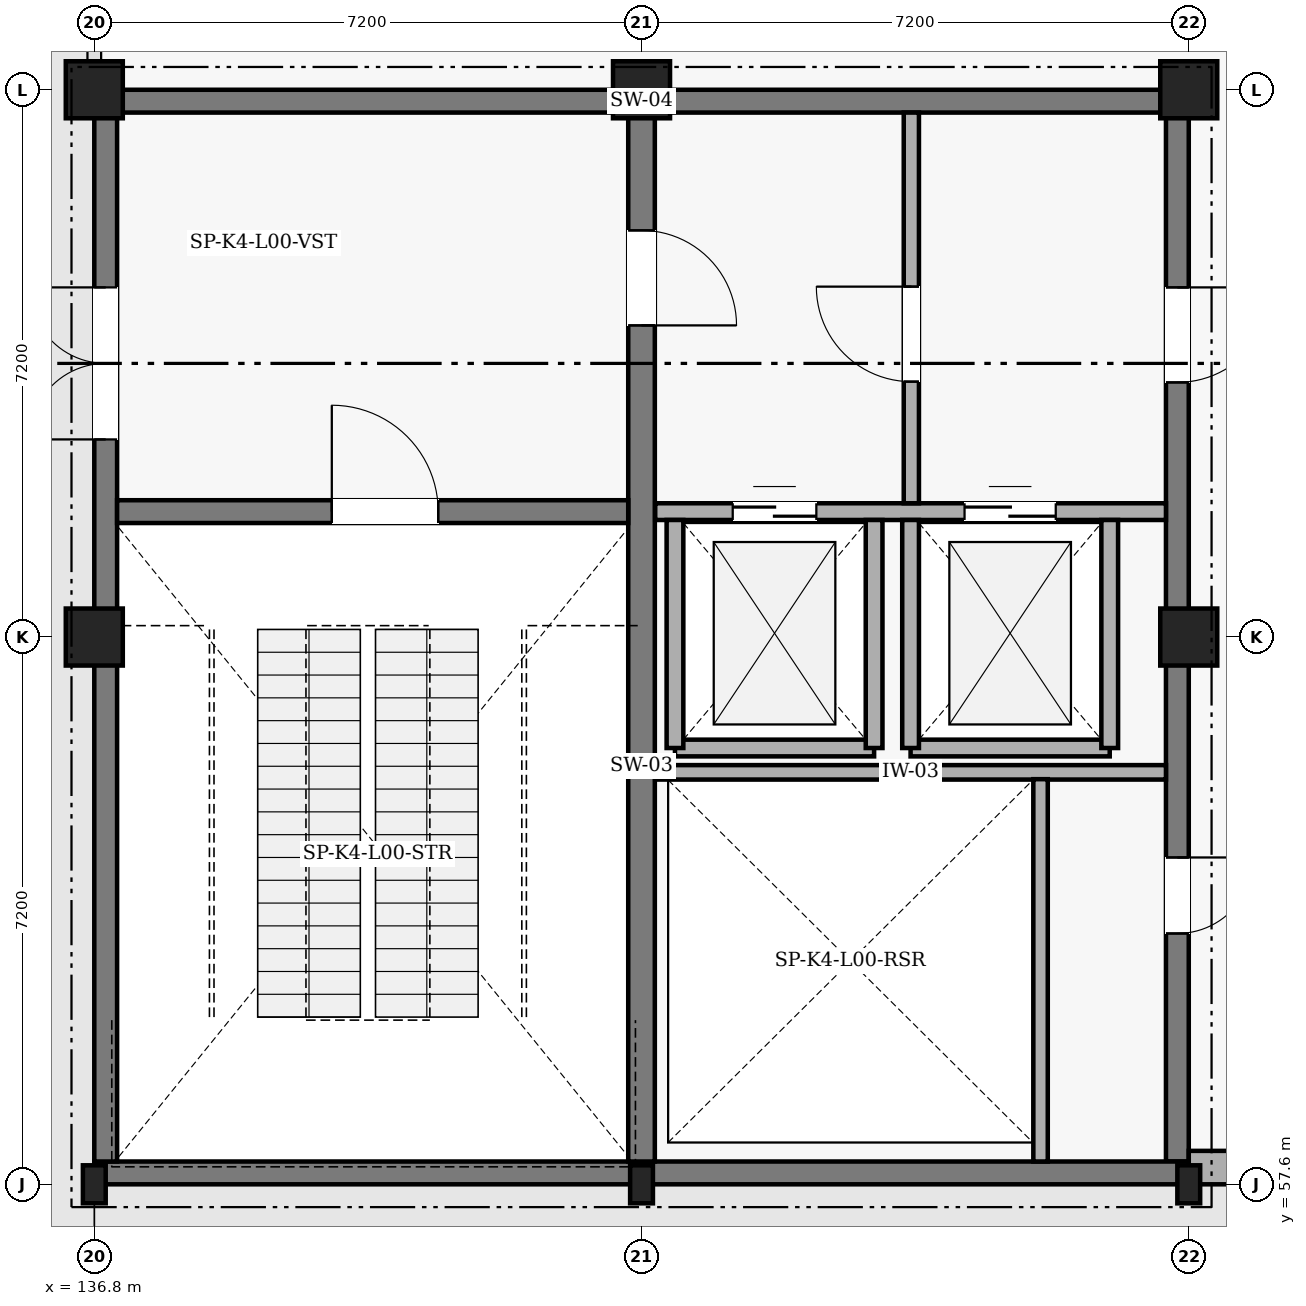
"""IFC4 building model, lengths in metres.
Left out: names, types, materials, properties, quantities, classifications, styles, units other than length and angle.
Written with IfcOpenShell. Run it as: python <this file> out.ifc"""

import sys

from ifc_helpers import new_model, si_unit, direction, frame, frame_2d, origin, origin_2d, place, context, subcontext, project, spatial, rectangle, i_section, extrude, element, fill, save


model = new_model("IFC4")
c1 = context("Model", 3, precision=1e-05, world=origin(), true_north=direction((0.0, 1.0)))
c2 = subcontext(c1, "Body", "Model", "MODEL_VIEW")
j1 = project(units=[si_unit("LENGTHUNIT", "METRE"), si_unit("PLANEANGLEUNIT", "RADIAN")], contexts=[c1])
p1 = place(None, origin())
s1 = spatial("IfcSite", under=j1, at=p1, CompositionType="ELEMENT")
p2 = place(p1, origin())
s2 = spatial("IfcBuilding", under=s1, at=p2, CompositionType="ELEMENT")
p3 = place(p2, origin())
s3 = spatial("IfcBuildingStorey", under=s2, at=p3, CompositionType="ELEMENT", Elevation=0.0)
p4 = place(p3, frame((136.8, 71.85, 0.0), z_axis=(0.0, 0.0, 1.0), x_axis=(1.0, 0.0, 0.0)))
e1 = element("IfcWall", 1, at=p4, inside=s3, PredefinedType="SHEAR", context=c2, shape_type="SweptSolid", body=[
    extrude(rectangle(XDim=14.4, YDim=0.3, at=frame_2d((7.2, 0.0))), origin(), (0.0, 0.0, 1.0), 5.4),
])
p5 = place(p3, frame((151.05, 71.7, 0.0), z_axis=(0.0, 0.0, 1.0), x_axis=(0.0, -1.0, 0.0)))
e2 = element("IfcWall", 2, at=p5, inside=s3, PredefinedType="SHEAR", context=c2, shape_type="SweptSolid", body=[
    extrude(rectangle(XDim=13.8, YDim=0.3, at=frame_2d((6.9, 0.0))), origin(), (0.0, 0.0, 1.0), 5.4),
])
p6 = place(p5, frame((9.8, 0.0, 0.0)))
e3 = element("IfcOpeningElement", 3, at=p6, cuts=e2, PredefinedType="OPENING", context=c2, shape_type="SweptSolid", body=[
    extrude(rectangle(XDim=1.0, YDim=2.15, at=frame_2d((0.5, 1.075))), frame((0.0, 0.16, 0.0), z_axis=(0.0, -1.0, 0.0), x_axis=(1.0, 0.0, 0.0)), (0.0, 0.0, 1.0), 0.32),
])
p7 = place(p5, frame((2.3, 0.0, 0.0)))
e4 = element("IfcOpeningElement", 4, at=p7, cuts=e2, PredefinedType="OPENING", context=c2, shape_type="SweptSolid", body=[
    extrude(rectangle(XDim=1.25, YDim=2.2, at=frame_2d((0.625, 1.1))), frame((0.0, 0.16, 0.0), z_axis=(0.0, -1.0, 0.0), x_axis=(1.0, 0.0, 0.0)), (0.0, 0.0, 1.0), 0.32),
])
p8 = place(p3, frame((151.2, 57.75, 0.0), z_axis=(0.0, 0.0, 1.0), x_axis=(-1.0, 0.0, 0.0)))
e5 = element("IfcWall", 5, at=p8, inside=s3, PredefinedType="SHEAR", context=c2, shape_type="SweptSolid", body=[
    extrude(rectangle(XDim=14.4, YDim=0.3, at=frame_2d((7.2, 0.0))), origin(), (0.0, 0.0, 1.0), 5.4),
])
p9 = place(p3, frame((136.95, 57.9, 0.0), z_axis=(0.0, 0.0, 1.0), x_axis=(0.0, 1.0, 0.0)))
e6 = element("IfcWall", 6, at=p9, inside=s3, PredefinedType="SHEAR", context=c2, shape_type="SweptSolid", body=[
    extrude(rectangle(XDim=13.8, YDim=0.3, at=frame_2d((6.9, 0.0))), origin(), (0.0, 0.0, 1.0), 5.4),
])
p10 = place(p9, frame((9.5, 0.0, 0.0)))
e7 = element("IfcOpeningElement", 7, at=p10, cuts=e6, PredefinedType="OPENING", context=c2, shape_type="SweptSolid", body=[
    extrude(rectangle(XDim=2.0, YDim=2.3, at=frame_2d((1.0, 1.15))), frame((0.0, 0.16, 0.0), z_axis=(0.0, -1.0, 0.0), x_axis=(1.0, 0.0, 0.0)), (0.0, 0.0, 1.0), 0.32),
])
p11 = place(p3, frame((144.0, 71.7, 0.0), z_axis=(0.0, 0.0, 1.0), x_axis=(0.0, -1.0, 0.0)))
e8 = element("IfcWall", 8, at=p11, inside=s3, PredefinedType="SHEAR", context=c2, shape_type="SweptSolid", body=[
    extrude(rectangle(XDim=13.8, YDim=0.35, at=frame_2d((6.9, 0.0))), origin(), (0.0, 0.0, 1.0), 5.4),
])
p12 = place(p11, frame((1.55, 0.0, 0.0)))
e9 = element("IfcOpeningElement", 9, at=p12, cuts=e8, PredefinedType="OPENING", context=c2, shape_type="SweptSolid", body=[
    extrude(rectangle(XDim=1.25, YDim=2.2, at=frame_2d((0.625, 1.1))), frame((0.0, 0.185, 0.0), z_axis=(0.0, -1.0, 0.0), x_axis=(1.0, 0.0, 0.0)), (0.0, 0.0, 1.0), 0.37),
])
p13 = place(p3, frame((137.1, 66.45, 0.0), z_axis=(0.0, 0.0, 1.0), x_axis=(1.0, 0.0, 0.0)))
e10 = element("IfcWall", 10, at=p13, inside=s3, PredefinedType="SHEAR", context=c2, shape_type="SweptSolid", body=[
    extrude(rectangle(XDim=6.725, YDim=0.3, at=frame_2d((3.362, 0.0))), origin(), (0.0, 0.0, 1.0), 5.4),
])
p14 = place(p13, frame((2.825, 0.0, 0.0)))
e11 = element("IfcOpeningElement", 11, at=p14, cuts=e10, PredefinedType="OPENING", context=c2, shape_type="SweptSolid", body=[
    extrude(rectangle(XDim=1.4, YDim=2.2, at=frame_2d((0.7, 1.1))), frame((0.0, 0.16, 0.0), z_axis=(0.0, -1.0, 0.0), x_axis=(1.0, 0.0, 0.0)), (0.0, 0.0, 1.0), 0.32),
])
p15 = place(p3, frame((136.8, 57.6, 0.0), z_axis=(0.0, 0.0, 1.0), x_axis=(1.0, 0.0, 0.0)))
e12 = element("IfcColumn", 12, at=p15, inside=s3, PredefinedType="COLUMN", context=c2, shape_type="SweptSolid", body=[
    extrude(i_section(OverallWidth=0.3, OverallDepth=0.5, WebThickness=0.014, FlangeThickness=0.028, FilletRadius=0.027, at=origin_2d()), origin(), (0.0, 0.0, 1.0), 5.1),
])
for number, where, z_axis, x_axis in (
    (13, (136.8, 64.8, 0.0), (0.0, 0.0, 1.0), (1.0, 0.0, 0.0)),
    (14, (136.8, 72.0, 0.0), (0.0, 0.0, 1.0), (1.0, 0.0, 0.0)),
):
    element("IfcColumn", number, at=place(p3, frame(where, z_axis=z_axis, x_axis=x_axis)), inside=s3, PredefinedType="COLUMN", context=c2, shape_type="SweptSolid", body=[
        extrude(rectangle(XDim=0.75, YDim=0.75, at=origin_2d()), origin(), (0.0, 0.0, 1.0), 5.1),
    ])
p16 = place(p3, frame((144.0, 57.6, 0.0), z_axis=(0.0, 0.0, 1.0), x_axis=(1.0, 0.0, 0.0)))
e15 = element("IfcColumn", 15, at=p16, inside=s3, PredefinedType="COLUMN", context=c2, shape_type="SweptSolid", body=[
    extrude(i_section(OverallWidth=0.3, OverallDepth=0.5, WebThickness=0.014, FlangeThickness=0.028, FilletRadius=0.027, at=origin_2d()), origin(), (0.0, 0.0, 1.0), 5.1),
])
p17 = place(p3, frame((144.0, 72.0, 0.0), z_axis=(0.0, 0.0, 1.0), x_axis=(1.0, 0.0, 0.0)))
e16 = element("IfcColumn", 16, at=p17, inside=s3, PredefinedType="COLUMN", context=c2, shape_type="SweptSolid", body=[
    extrude(rectangle(XDim=0.75, YDim=0.75, at=origin_2d()), origin(), (0.0, 0.0, 1.0), 5.1),
])
p18 = place(p3, frame((151.2, 57.6, 0.0), z_axis=(0.0, 0.0, 1.0), x_axis=(1.0, 0.0, 0.0)))
e17 = element("IfcColumn", 17, at=p18, inside=s3, PredefinedType="COLUMN", context=c2, shape_type="SweptSolid", body=[
    extrude(i_section(OverallWidth=0.3, OverallDepth=0.5, WebThickness=0.014, FlangeThickness=0.028, FilletRadius=0.027, at=origin_2d()), origin(), (0.0, 0.0, 1.0), 5.1),
])
for number, where, z_axis, x_axis in (
    (18, (151.2, 64.8, 0.0), (0.0, 0.0, 1.0), (1.0, 0.0, 0.0)),
    (19, (151.2, 72.0, 0.0), (0.0, 0.0, 1.0), (1.0, 0.0, 0.0)),
):
    element("IfcColumn", number, at=place(p3, frame(where, z_axis=z_axis, x_axis=x_axis)), inside=s3, PredefinedType="COLUMN", context=c2, shape_type="SweptSolid", body=[
        extrude(rectangle(XDim=0.75, YDim=0.75, at=origin_2d()), origin(), (0.0, 0.0, 1.0), 5.1),
    ])
p19 = place(p3, frame((158.4, 57.82, 0.0), z_axis=(0.0, 0.0, 1.0), x_axis=(-1.0, 0.0, 0.0)))
e20 = element("IfcWall", 20, at=p19, inside=s3, PredefinedType="SOLIDWALL", context=c2, shape_type="SweptSolid", body=[
    extrude(rectangle(XDim=7.2, YDim=0.44, at=frame_2d((3.6, 0.0))), origin(), (0.0, 0.0, 1.0), 4.6),
])
p20 = place(p3, frame((144.18, 63.02, 0.0), z_axis=(0.0, 0.0, 1.0), x_axis=(1.0, 0.0, 0.0)))
e21 = element("IfcWall", 21, at=p20, inside=s3, PredefinedType="PARTITIONING", context=c2, shape_type="SweptSolid", body=[
    extrude(rectangle(XDim=6.72, YDim=0.19, at=frame_2d((3.36, 0.0))), origin(), (0.0, 0.0, 1.0), 5.05),
])
p21 = place(p3, frame((149.25, 57.9, 0.0), z_axis=(0.0, 0.0, 1.0), x_axis=(0.0, 1.0, 0.0)))
e22 = element("IfcWall", 22, at=p21, inside=s3, PredefinedType="PARTITIONING", context=c2, shape_type="SweptSolid", body=[
    extrude(rectangle(XDim=5.03, YDim=0.19, at=frame_2d((2.515, 0.0))), origin(), (0.0, 0.0, 1.0), 5.05),
])
p22 = place(p3, frame((144.18, 66.45, 0.0), z_axis=(0.0, 0.0, 1.0), x_axis=(1.0, 0.0, 0.0)))
e23 = element("IfcWall", 23, at=p22, inside=s3, PredefinedType="PARTITIONING", context=c2, shape_type="SweptSolid", body=[
    extrude(rectangle(XDim=6.72, YDim=0.22, at=frame_2d((3.36, 0.0))), origin(), (0.0, 0.0, 1.0), 5.05),
])
p23 = place(p22, frame((1.02, 0.0, 0.0)))
e24 = element("IfcOpeningElement", 24, at=p23, cuts=e23, PredefinedType="OPENING", context=c2, shape_type="SweptSolid", body=[
    extrude(rectangle(XDim=1.1, YDim=2.15, at=frame_2d((0.55, 1.075))), frame((0.0, 0.12, 0.0), z_axis=(0.0, -1.0, 0.0), x_axis=(1.0, 0.0, 0.0)), (0.0, 0.0, 1.0), 0.24),
])
p24 = place(p22, frame((4.07, 0.0, 0.0)))
e25 = element("IfcOpeningElement", 25, at=p24, cuts=e23, PredefinedType="OPENING", context=c2, shape_type="SweptSolid", body=[
    extrude(rectangle(XDim=1.2, YDim=2.15, at=frame_2d((0.6, 1.075))), frame((0.0, 0.12, 0.0), z_axis=(0.0, -1.0, 0.0), x_axis=(1.0, 0.0, 0.0)), (0.0, 0.0, 1.0), 0.24),
])
p25 = place(p3, frame((144.44, 63.34, 0.0), z_axis=(0.0, 0.0, 1.0), x_axis=(1.0, 0.0, 0.0)))
e26 = element("IfcWall", 26, at=p25, inside=s3, PredefinedType="PARTITIONING", context=c2, shape_type="SweptSolid", body=[
    extrude(rectangle(XDim=2.62, YDim=0.22, at=frame_2d((1.31, 0.0))), origin(), (0.0, 0.0, 1.0), 5.05),
])
for number, where, z_axis, x_axis in (
    (27, (144.44, 63.34, 0.0), (0.0, 0.0, 1.0), (0.0, 1.0, 0.0)),
    (28, (147.06, 63.34, 0.0), (0.0, 0.0, 1.0), (0.0, 1.0, 0.0)),
):
    element("IfcWall", number, at=place(p3, frame(where, z_axis=z_axis, x_axis=x_axis)), inside=s3, PredefinedType="PARTITIONING", context=c2, shape_type="SweptSolid", body=[
        extrude(rectangle(XDim=3.0, YDim=0.22, at=frame_2d((1.5, 0.0))), origin(), (0.0, 0.0, 1.0), 5.05),
    ])
p26 = place(p3, frame((147.54, 63.34, 0.0), z_axis=(0.0, 0.0, 1.0), x_axis=(1.0, 0.0, 0.0)))
e29 = element("IfcWall", 29, at=p26, inside=s3, PredefinedType="PARTITIONING", context=c2, shape_type="SweptSolid", body=[
    extrude(rectangle(XDim=2.62, YDim=0.22, at=frame_2d((1.31, 0.0))), origin(), (0.0, 0.0, 1.0), 5.05),
])
for number, where, z_axis, x_axis in (
    (30, (147.54, 63.34, 0.0), (0.0, 0.0, 1.0), (0.0, 1.0, 0.0)),
    (31, (150.16, 63.34, 0.0), (0.0, 0.0, 1.0), (0.0, 1.0, 0.0)),
):
    element("IfcWall", number, at=place(p3, frame(where, z_axis=z_axis, x_axis=x_axis)), inside=s3, PredefinedType="PARTITIONING", context=c2, shape_type="SweptSolid", body=[
        extrude(rectangle(XDim=3.0, YDim=0.22, at=frame_2d((1.5, 0.0))), origin(), (0.0, 0.0, 1.0), 5.05),
    ])
p27 = place(p3, frame((147.55, 66.56, 0.0), z_axis=(0.0, 0.0, 1.0), x_axis=(0.0, 1.0, 0.0)))
e32 = element("IfcWall", 32, at=p27, inside=s3, PredefinedType="PARTITIONING", context=c2, shape_type="SweptSolid", body=[
    extrude(rectangle(XDim=5.14, YDim=0.2, at=frame_2d((2.57, 0.0))), origin(), (0.0, 0.0, 1.0), 5.05),
])
p28 = place(p27, frame((1.6, 0.0, 0.0)))
e33 = element("IfcOpeningElement", 33, at=p28, cuts=e32, PredefinedType="OPENING", context=c2, shape_type="SweptSolid", body=[
    extrude(rectangle(XDim=1.25, YDim=2.2, at=frame_2d((0.625, 1.1))), frame((0.0, 0.11, 0.0), z_axis=(0.0, -1.0, 0.0), x_axis=(1.0, 0.0, 0.0)), (0.0, 0.0, 1.0), 0.22),
])
p29 = place(p10, origin())
e34 = element("IfcDoor", 34, at=p29, inside=s3, OperationType="DOUBLE_DOOR_SINGLE_SWING", PredefinedType="DOOR", context=c2, shape_type="SweptSolid", body=[
    extrude(rectangle(XDim=2.0, YDim=2.3, at=frame_2d((1.0, 1.15))), frame((0.0, 0.025, 0.0), z_axis=(0.0, -1.0, 0.0), x_axis=(1.0, 0.0, 0.0)), (0.0, 0.0, 1.0), 0.05),
])
fill(e7, e34)
p30 = place(p14, origin())
e35 = element("IfcDoor", 35, at=p30, inside=s3, OperationType="SINGLE_SWING_LEFT", PredefinedType="DOOR", context=c2, shape_type="SweptSolid", body=[
    extrude(rectangle(XDim=1.4, YDim=2.2, at=frame_2d((0.7, 1.1))), frame((0.0, 0.025, 0.0), z_axis=(0.0, -1.0, 0.0), x_axis=(1.0, 0.0, 0.0)), (0.0, 0.0, 1.0), 0.05),
])
fill(e11, e35)
p31 = place(p12, origin())
e36 = element("IfcDoor", 36, at=p31, inside=s3, OperationType="SINGLE_SWING_RIGHT", PredefinedType="DOOR", context=c2, shape_type="SweptSolid", body=[
    extrude(rectangle(XDim=1.25, YDim=2.2, at=frame_2d((0.625, 1.1))), frame((0.0, 0.025, 0.0), z_axis=(0.0, -1.0, 0.0), x_axis=(1.0, 0.0, 0.0)), (0.0, 0.0, 1.0), 0.05),
])
fill(e9, e36)
p32 = place(p6, origin())
e37 = element("IfcDoor", 37, at=p32, inside=s3, OperationType="SINGLE_SWING_LEFT", PredefinedType="DOOR", context=c2, shape_type="SweptSolid", body=[
    extrude(rectangle(XDim=1.0, YDim=2.15, at=frame_2d((0.5, 1.075))), frame((0.0, 0.025, 0.0), z_axis=(0.0, -1.0, 0.0), x_axis=(1.0, 0.0, 0.0)), (0.0, 0.0, 1.0), 0.05),
])
fill(e3, e37)
p33 = place(p23, origin())
e38 = element("IfcDoor", 38, at=p33, inside=s3, OperationType="DOUBLE_DOOR_SLIDING", PredefinedType="DOOR", context=c2, shape_type="SweptSolid", body=[
    extrude(rectangle(XDim=1.1, YDim=2.15, at=frame_2d((0.55, 1.075))), frame((0.0, 0.025, 0.0), z_axis=(0.0, -1.0, 0.0), x_axis=(1.0, 0.0, 0.0)), (0.0, 0.0, 1.0), 0.05),
])
fill(e24, e38)
p34 = place(p24, origin())
e39 = element("IfcDoor", 39, at=p34, inside=s3, OperationType="DOUBLE_DOOR_SLIDING", PredefinedType="DOOR", context=c2, shape_type="SweptSolid", body=[
    extrude(rectangle(XDim=1.2, YDim=2.15, at=frame_2d((0.6, 1.075))), frame((0.0, 0.025, 0.0), z_axis=(0.0, -1.0, 0.0), x_axis=(1.0, 0.0, 0.0)), (0.0, 0.0, 1.0), 0.05),
])
fill(e25, e39)
p35 = place(p28, origin())
e40 = element("IfcDoor", 40, at=p35, inside=s3, OperationType="SINGLE_SWING_RIGHT", PredefinedType="DOOR", context=c2, shape_type="SweptSolid", body=[
    extrude(rectangle(XDim=1.25, YDim=2.2, at=frame_2d((0.625, 1.1))), frame((0.0, 0.025, 0.0), z_axis=(0.0, -1.0, 0.0), x_axis=(1.0, 0.0, 0.0)), (0.0, 0.0, 1.0), 0.05),
])
fill(e33, e40)
p36 = place(p7, origin())
e41 = element("IfcDoor", 41, at=p36, inside=s3, OperationType="SINGLE_SWING_LEFT", PredefinedType="DOOR", context=c2, shape_type="SweptSolid", body=[
    extrude(rectangle(XDim=1.25, YDim=2.2, at=frame_2d((0.625, 1.1))), frame((0.0, 0.025, 0.0), z_axis=(0.0, -1.0, 0.0), x_axis=(1.0, 0.0, 0.0)), (0.0, 0.0, 1.0), 0.05),
])
fill(e4, e41)
save(model, sys.argv[1])
